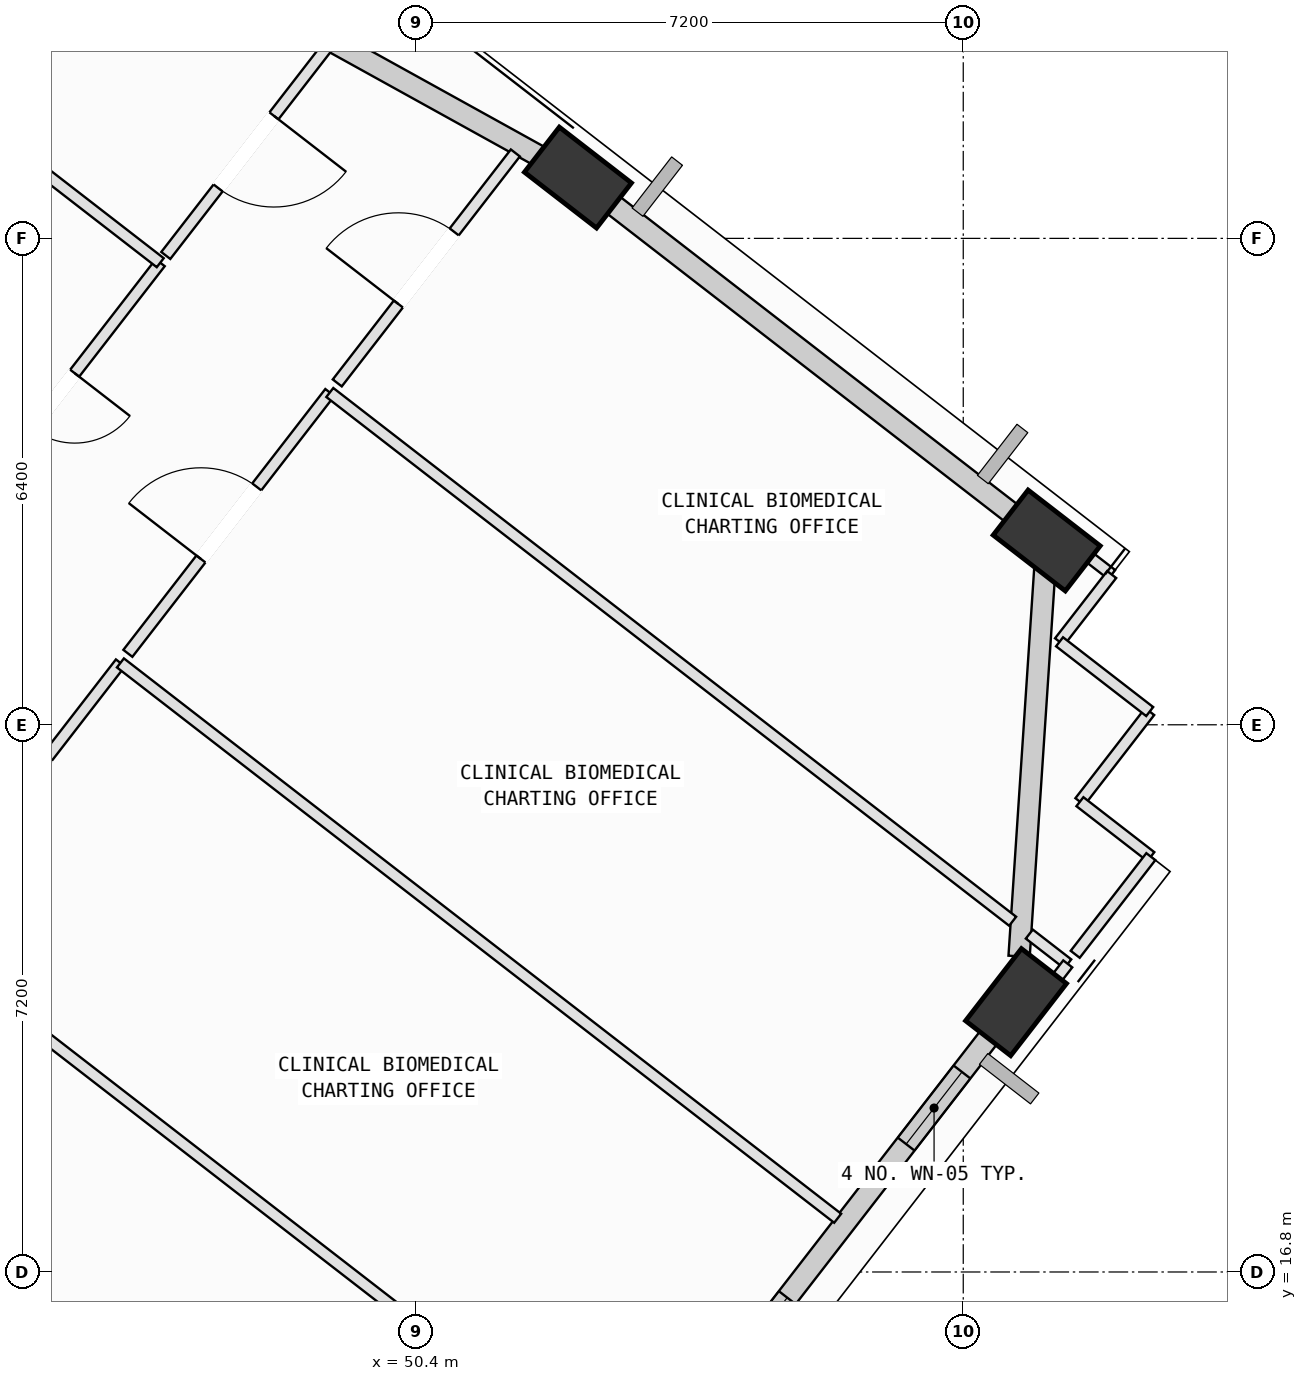
"""IFC4 building model, lengths in metres.
Left out: names, types, materials, properties, quantities, classifications, styles, units other than length and angle.
Written with IfcOpenShell. Run it as: python <this file> out.ifc"""

import sys

from ifc_helpers import new_model, si_unit, direction, frame, frame_2d, origin, origin_2d, place, context, subcontext, project, spatial, rectangle, extrude, element, fill, save


model = new_model("IFC4")
c1 = context("Model", 3, precision=1e-05, world=origin(), true_north=direction((0.0, 1.0)))
c2 = subcontext(c1, "Body", "Model", "MODEL_VIEW")
j1 = project(units=[si_unit("LENGTHUNIT", "METRE"), si_unit("PLANEANGLEUNIT", "RADIAN")], contexts=[c1])
p1 = place(None, origin())
s1 = spatial("IfcSite", under=j1, at=p1, CompositionType="ELEMENT")
p2 = place(p1, origin())
s2 = spatial("IfcBuilding", under=s1, at=p2, CompositionType="ELEMENT")
p3 = place(p2, frame((0.0, 0.0, 247.2)))
s3 = spatial("IfcBuildingStorey", under=s2, at=p3, CompositionType="ELEMENT", Elevation=247.2)
p4 = place(p3, frame((58.295, 20.35, 0.002), z_axis=(0.017499830778, 0.101960819603, 0.994634479188), x_axis=(-0.73642938772, -0.671551052003, 0.081798175143)))
e1 = element("IfcColumn", 1, at=p4, inside=s3, PredefinedType="COLUMN", context=c2, shape_type="SweptSolid", body=[
    extrude(rectangle(XDim=1.2, YDim=0.75, at=origin_2d()), origin(), (0.0, 0.0, 1.0), 4.018),
])
p5 = place(p3, frame((58.698, 26.425, 0.002), z_axis=(-0.007595219156, 0.103416504035, 0.994609138978), x_axis=(0.833166287037, -0.549366665738, 0.063483893394)))
e2 = element("IfcColumn", 2, at=p5, inside=s3, PredefinedType="COLUMN", context=c2, shape_type="SweptSolid", body=[
    extrude(rectangle(XDim=1.2, YDim=0.75, at=origin_2d()), origin(), (0.0, 0.0, 1.0), 4.018),
])
p6 = place(p3, frame((52.531, 31.2, 0.002), z_axis=(-0.027092719635, 0.07799050304, 0.996585904967), x_axis=(0.947118439295, -0.316878141948, 0.050546069114)))
e3 = element("IfcColumn", 3, at=p6, inside=s3, PredefinedType="COLUMN", context=c2, shape_type="SweptSolid", body=[
    extrude(rectangle(XDim=1.2, YDim=0.75, at=origin_2d()), origin(), (0.0, 0.0, 1.0), 4.01),
])
p7 = place(p3, frame((58.171, 20.191, 0.0), z_axis=(0.0, 0.0, 1.0), x_axis=(-0.612216921809, -0.790689851112, 0.0)))
e4 = element("IfcWall", 4, at=p7, inside=s3, PredefinedType="SOLIDWALL", context=c2, shape_type="SweptSolid", body=[
    extrude(rectangle(XDim=6.418, YDim=0.28, at=frame_2d((3.209, 0.0))), origin(), (0.0, 0.0, 1.0), 3.265),
])
p8 = place(p7, frame((0.96, 0.0, 0.75)))
e5 = element("IfcOpeningElement", 5, at=p8, cuts=e4, PredefinedType="OPENING", context=c2, shape_type="SweptSolid", body=[
    extrude(rectangle(XDim=1.2, YDim=1.75, at=frame_2d((0.6, 0.875))), frame((0.0, 0.15, 0.0), z_axis=(0.0, -1.0, 0.0), x_axis=(1.0, 0.0, 0.0)), (0.0, 0.0, 1.0), 0.3),
])
p9 = place(p7, frame((4.715, 0.0, 0.75)))
e6 = element("IfcOpeningElement", 6, at=p9, cuts=e4, PredefinedType="OPENING", context=c2, shape_type="SweptSolid", body=[
    extrude(rectangle(XDim=1.2, YDim=1.75, at=frame_2d((0.6, 0.875))), frame((0.0, 0.15, 0.0), z_axis=(0.0, -1.0, 0.0), x_axis=(1.0, 0.0, 0.0)), (0.0, 0.0, 1.0), 0.3),
])
p10 = place(p3, frame((58.685, 26.235, 0.0), z_axis=(0.0, 0.0, 1.0), x_axis=(-0.066222112401, -0.997804906697, 0.0)))
e7 = element("IfcWall", 7, at=p10, inside=s3, PredefinedType="SOLIDWALL", context=c2, shape_type="SweptSolid", body=[
    extrude(rectangle(XDim=5.294, YDim=0.28, at=frame_2d((2.647, 0.0))), origin(), (0.0, 0.0, 1.0), 3.265),
])
p11 = place(p3, frame((52.727, 31.048, 0.0), z_axis=(0.0, 0.0, 1.0), x_axis=(0.790704771372, -0.612197651522, 0.0)))
e8 = element("IfcWall", 8, at=p11, inside=s3, PredefinedType="SOLIDWALL", context=c2, shape_type="SweptSolid", body=[
    extrude(rectangle(XDim=7.046, YDim=0.28, at=frame_2d((3.523, 0.0))), origin(), (0.0, 0.0, 1.0), 3.265),
])
p12 = place(p3, frame((44.182, 35.82, 0.0), z_axis=(0.0, 0.0, 1.0), x_axis=(0.874960254065, -0.48419474781, 0.0)))
e9 = element("IfcWall", 9, at=p12, inside=s3, PredefinedType="SOLIDWALL", context=c2, shape_type="SweptSolid", body=[
    extrude(rectangle(XDim=9.036, YDim=0.28, at=frame_2d((4.518, 0.0))), origin(), (0.0, 0.0, 1.0), 3.265),
])
p13 = place(p3, frame((41.001, 17.697, 0.0), z_axis=(0.0, 0.0, 1.0), x_axis=(0.790650233598, -0.612268085164, 0.0)))
e10 = element("IfcWall", 10, at=p13, inside=s3, PredefinedType="PARTITIONING", context=c2, shape_type="SweptSolid", body=[
    extrude(rectangle(XDim=11.935, YDim=0.15, at=frame_2d((5.967, 0.0))), origin(), (0.0, 0.0, 1.0), 3.78),
])
p14 = place(p3, frame((43.756, 21.256, 0.0), z_axis=(0.0, 0.0, 1.0), x_axis=(0.790680905168, -0.612228475492, 0.0)))
e11 = element("IfcWall", 11, at=p14, inside=s3, PredefinedType="PARTITIONING", context=c2, shape_type="SweptSolid", body=[
    extrude(rectangle(XDim=11.935, YDim=0.15, at=frame_2d((5.968, 0.0))), origin(), (0.0, 0.0, 1.0), 3.78),
])
p15 = place(p3, frame((43.854, 21.382, 0.0), z_axis=(0.0, 0.0, 1.0), x_axis=(0.612178865646, 0.790719315849, 0.0)))
e12 = element("IfcWall", 12, at=p15, inside=s3, PredefinedType="PARTITIONING", context=c2, shape_type="SweptSolid", body=[
    extrude(rectangle(XDim=4.34, YDim=0.15, at=frame_2d((2.17, 0.0))), origin(), (0.0, 0.0, 1.0), 3.78),
])
p16 = place(p15, frame((1.57, 0.0, 0.0)))
e13 = element("IfcOpeningElement", 13, at=p16, cuts=e12, PredefinedType="OPENING", context=c2, shape_type="SweptSolid", body=[
    extrude(rectangle(XDim=1.2, YDim=2.15, at=frame_2d((0.6, 1.075))), frame((0.0, 0.085, 0.0), z_axis=(0.0, -1.0, 0.0), x_axis=(1.0, 0.0, 0.0)), (0.0, 0.0, 1.0), 0.17),
])
p17 = place(p3, frame((46.511, 24.814, 0.0), z_axis=(0.0, 0.0, 1.0), x_axis=(0.790690807158, -0.612215687055, 0.0)))
e14 = element("IfcWall", 14, at=p17, inside=s3, PredefinedType="PARTITIONING", context=c2, shape_type="SweptSolid", body=[
    extrude(rectangle(XDim=11.935, YDim=0.15, at=frame_2d((5.968, 0.0))), origin(), (0.0, 0.0, 1.0), 3.78),
])
p18 = place(p3, frame((46.609, 24.94, 0.0), z_axis=(0.0, 0.0, 1.0), x_axis=(0.612186806235, 0.790713168141, 0.0)))
e15 = element("IfcWall", 15, at=p18, inside=s3, PredefinedType="PARTITIONING", context=c2, shape_type="SweptSolid", body=[
    extrude(rectangle(XDim=4.341, YDim=0.15, at=frame_2d((2.17, 0.0))), origin(), (0.0, 0.0, 1.0), 3.78),
])
p19 = place(p18, frame((1.57, 0.0, 0.0)))
e16 = element("IfcOpeningElement", 16, at=p19, cuts=e15, PredefinedType="OPENING", context=c2, shape_type="SweptSolid", body=[
    extrude(rectangle(XDim=1.2, YDim=2.15, at=frame_2d((0.6, 1.075))), frame((0.0, 0.085, 0.0), z_axis=(0.0, -1.0, 0.0), x_axis=(1.0, 0.0, 0.0)), (0.0, 0.0, 1.0), 0.17),
])
p20 = place(p3, frame((49.266, 28.372, 0.0), z_axis=(0.0, 0.0, 1.0), x_axis=(0.790648548944, -0.612270260631, 0.0)))
e17 = element("IfcWall", 17, at=p20, inside=s3, PredefinedType="PARTITIONING", context=c2, shape_type="SweptSolid", body=[
    extrude(rectangle(XDim=11.363, YDim=0.15, at=frame_2d((5.681, 0.0))), origin(), (0.0, 0.0, 1.0), 3.78),
])
p21 = place(p3, frame((58.469, 21.246, 0.0), z_axis=(0.0, 0.0, 1.0), x_axis=(0.790521208436, -0.612434665098, 0.0)))
e18 = element("IfcWall", 18, at=p21, inside=s3, PredefinedType="PARTITIONING", context=c2, shape_type="SweptSolid", body=[
    extrude(rectangle(XDim=0.64, YDim=0.15, at=frame_2d((0.32, 0.0))), origin(), (0.0, 0.0, 1.0), 3.78),
])
p22 = place(p3, frame((58.975, 20.854, 0.0), z_axis=(0.0, 0.0, 1.0), x_axis=(-0.611960031157, -0.790888690188, 0.0)))
e19 = element("IfcWall", 19, at=p22, inside=s3, PredefinedType="PARTITIONING", context=c2, shape_type="SweptSolid", body=[
    extrude(rectangle(XDim=1.017, YDim=0.15, at=frame_2d((0.508, 0.0))), origin(), (0.0, 0.0, 1.0), 3.265),
])
p23 = place(p3, frame((60.053, 24.174, 0.0), z_axis=(0.0, 0.0, 1.0), x_axis=(-0.612068124606, -0.790805039717, 0.0)))
e20 = element("IfcWall", 20, at=p23, inside=s3, PredefinedType="PARTITIONING", context=c2, shape_type="SweptSolid", body=[
    extrude(rectangle(XDim=1.5, YDim=0.15, at=frame_2d((0.75, 0.0))), origin(), (0.0, 0.0, 1.0), 3.78),
])
p24 = place(p3, frame((59.135, 22.988, 0.0), z_axis=(0.0, 0.0, 1.0), x_axis=(0.790420058824, -0.61256520519, 0.0)))
e21 = element("IfcWall", 21, at=p24, inside=s3, PredefinedType="PARTITIONING", context=c2, shape_type="SweptSolid", body=[
    extrude(rectangle(XDim=1.18, YDim=0.15, at=frame_2d((0.59, 0.0))), origin(), (0.0, 0.0, 1.0), 3.78),
])
p25 = place(p3, frame((60.068, 22.265, 0.0), z_axis=(0.0, 0.0, 1.0), x_axis=(-0.612306498118, -0.790620485671, 0.0)))
e22 = element("IfcWall", 22, at=p25, inside=s3, PredefinedType="PARTITIONING", context=c2, shape_type="SweptSolid", body=[
    extrude(rectangle(XDim=1.625, YDim=0.15, at=frame_2d((0.812, 0.0))), origin(), (0.0, 0.0, 1.0), 3.78),
])
p26 = place(p3, frame((49.364, 28.498, 0.0), z_axis=(0.0, 0.0, 1.0), x_axis=(0.612238811962, 0.790672901475, 0.0)))
e23 = element("IfcWall", 23, at=p26, inside=s3, PredefinedType="PARTITIONING", context=c2, shape_type="SweptSolid", body=[
    extrude(rectangle(XDim=3.827, YDim=0.15, at=frame_2d((1.914, 0.0))), origin(), (0.0, 0.0, 1.0), 3.78),
])
p27 = place(p26, frame((1.313, 0.0, 0.0)))
e24 = element("IfcOpeningElement", 24, at=p27, cuts=e23, PredefinedType="OPENING", context=c2, shape_type="SweptSolid", body=[
    extrude(rectangle(XDim=1.2, YDim=2.15, at=frame_2d((0.6, 1.075))), frame((0.0, 0.085, 0.0), z_axis=(0.0, -1.0, 0.0), x_axis=(1.0, 0.0, 0.0)), (0.0, 0.0, 1.0), 0.17),
])
p28 = place(p3, frame((52.21, 31.664, 0.0), z_axis=(0.0, 0.0, 1.0), x_axis=(0.790655761148, -0.612260947116, 0.0)))
e25 = element("IfcWall", 25, at=p28, inside=s3, PredefinedType="PARTITIONING", context=c2, shape_type="SweptSolid", body=[
    extrude(rectangle(XDim=0.786, YDim=0.15, at=frame_2d((0.393, 0.0))), origin(), (0.0, 0.0, 1.0), 3.265),
])
p29 = place(p3, frame((58.402, 26.868, 0.0), z_axis=(0.0, 0.0, 1.0), x_axis=(0.790768234829, -0.612115674351, 0.0)))
e26 = element("IfcWall", 26, at=p29, inside=s3, PredefinedType="PARTITIONING", context=c2, shape_type="SweptSolid", body=[
    extrude(rectangle(XDim=1.455, YDim=0.15, at=frame_2d((0.728, 0.0))), origin(), (0.0, 0.0, 1.0), 3.265),
])
p30 = place(p3, frame((59.553, 25.977, 0.0), z_axis=(0.0, 0.0, 1.0), x_axis=(-0.612656795553, -0.790349068996, 0.0)))
e27 = element("IfcWall", 27, at=p30, inside=s3, PredefinedType="PARTITIONING", context=c2, shape_type="SweptSolid", body=[
    extrude(rectangle(XDim=1.12, YDim=0.15, at=frame_2d((0.56, 0.0))), origin(), (0.0, 0.0, 1.0), 3.78),
])
p31 = place(p3, frame((58.867, 25.092, 0.0), z_axis=(0.0, 0.0, 1.0), x_axis=(0.790805039717, -0.612068124606, 0.0)))
e28 = element("IfcWall", 28, at=p31, inside=s3, PredefinedType="PARTITIONING", context=c2, shape_type="SweptSolid", body=[
    extrude(rectangle(XDim=1.5, YDim=0.15, at=frame_2d((0.75, 0.0))), origin(), (0.0, 0.0, 1.0), 3.78),
])
p32 = place(p3, frame((47.035, 30.08, 0.0), z_axis=(0.0, 0.0, 1.0), x_axis=(-0.612273865453, -0.790645757393, 0.0)))
e29 = element("IfcWall", 29, at=p32, inside=s3, PredefinedType="PARTITIONING", context=c2, shape_type="SweptSolid", body=[
    extrude(rectangle(XDim=4.597, YDim=0.15, at=frame_2d((2.299, 0.0))), origin(), (0.0, 0.0, 1.0), 3.78),
])
p33 = place(p32, frame((1.839, 0.0, 0.0)))
e30 = element("IfcOpeningElement", 30, at=p33, cuts=e29, PredefinedType="OPENING", context=c2, shape_type="SweptSolid", body=[
    extrude(rectangle(XDim=0.92, YDim=2.1, at=frame_2d((0.46, 1.05))), frame((0.0, 0.085, 0.0), z_axis=(0.0, -1.0, 0.0), x_axis=(1.0, 0.0, 0.0)), (0.0, 0.0, 1.0), 0.17),
])
p34 = place(p3, frame((42.35, 33.708, 0.0), z_axis=(0.0, 0.0, 1.0), x_axis=(0.790643922071, -0.612276235446, 0.0)))
e31 = element("IfcWall", 31, at=p34, inside=s3, PredefinedType="PARTITIONING", context=c2, shape_type="SweptSolid", body=[
    extrude(rectangle(XDim=5.925, YDim=0.15, at=frame_2d((2.963, 0.0))), origin(), (0.0, 0.0, 1.0), 3.78),
])
p35 = place(p3, frame((49.219, 32.901, 0.0), z_axis=(0.0, 0.0, 1.0), x_axis=(-0.612311720881, -0.790616440805, 0.0)))
e32 = element("IfcWall", 32, at=p35, inside=s3, PredefinedType="PARTITIONING", context=c2, shape_type="SweptSolid", body=[
    extrude(rectangle(XDim=3.448, YDim=0.15, at=frame_2d((1.724, 0.0))), origin(), (0.0, 0.0, 1.0), 3.78),
])
p36 = place(p35, frame((1.124, 0.0, 0.0)))
e33 = element("IfcOpeningElement", 33, at=p36, cuts=e32, PredefinedType="OPENING", context=c2, shape_type="SweptSolid", body=[
    extrude(rectangle(XDim=1.2, YDim=2.15, at=frame_2d((0.6, 1.075))), frame((0.0, 0.085, 0.0), z_axis=(0.0, -1.0, 0.0), x_axis=(1.0, 0.0, 0.0)), (0.0, 0.0, 1.0), 0.17),
])
p37 = place(p8, origin())
e34 = element("IfcWindow", 34, at=p37, inside=s3, PartitioningType="SINGLE_PANEL", PredefinedType="WINDOW", context=c2, shape_type="SweptSolid", body=[
    extrude(rectangle(XDim=1.2, YDim=1.75, at=frame_2d((0.6, 0.875))), frame((0.0, 0.03, 0.0), z_axis=(0.0, -1.0, 0.0), x_axis=(1.0, 0.0, 0.0)), (0.0, 0.0, 1.0), 0.06),
])
fill(e5, e34)
p38 = place(p9, origin())
e35 = element("IfcWindow", 35, at=p38, inside=s3, PartitioningType="SINGLE_PANEL", PredefinedType="WINDOW", context=c2, shape_type="SweptSolid", body=[
    extrude(rectangle(XDim=1.2, YDim=1.75, at=frame_2d((0.6, 0.875))), frame((0.0, 0.03, 0.0), z_axis=(0.0, -1.0, 0.0), x_axis=(1.0, 0.0, 0.0)), (0.0, 0.0, 1.0), 0.06),
])
fill(e6, e35)
p39 = place(p19, origin())
e36 = element("IfcDoor", 36, at=p39, inside=s3, OperationType="SINGLE_SWING_LEFT", PredefinedType="DOOR", context=c2, shape_type="SweptSolid", body=[
    extrude(rectangle(XDim=1.2, YDim=2.15, at=frame_2d((0.6, 1.075))), frame((0.0, 0.025, 0.0), z_axis=(0.0, -1.0, 0.0), x_axis=(1.0, 0.0, 0.0)), (0.0, 0.0, 1.0), 0.05),
])
fill(e16, e36)
p40 = place(p27, origin())
e37 = element("IfcDoor", 37, at=p40, inside=s3, OperationType="SINGLE_SWING_LEFT", PredefinedType="DOOR", context=c2, shape_type="SweptSolid", body=[
    extrude(rectangle(XDim=1.2, YDim=2.15, at=frame_2d((0.6, 1.075))), frame((0.0, 0.025, 0.0), z_axis=(0.0, -1.0, 0.0), x_axis=(1.0, 0.0, 0.0)), (0.0, 0.0, 1.0), 0.05),
])
fill(e24, e37)
p41 = place(p33, origin())
e38 = element("IfcDoor", 38, at=p41, inside=s3, OperationType="SINGLE_SWING_LEFT", PredefinedType="DOOR", context=c2, shape_type="SweptSolid", body=[
    extrude(rectangle(XDim=0.92, YDim=2.1, at=frame_2d((0.46, 1.05))), frame((0.0, 0.025, 0.0), z_axis=(0.0, -1.0, 0.0), x_axis=(1.0, 0.0, 0.0)), (0.0, 0.0, 1.0), 0.05),
])
fill(e30, e38)
p42 = place(p36, origin())
e39 = element("IfcDoor", 39, at=p42, inside=s3, OperationType="SINGLE_SWING_LEFT", PredefinedType="DOOR", context=c2, shape_type="SweptSolid", body=[
    extrude(rectangle(XDim=1.2, YDim=2.15, at=frame_2d((0.6, 1.075))), frame((0.0, 0.025, 0.0), z_axis=(0.0, -1.0, 0.0), x_axis=(1.0, 0.0, 0.0)), (0.0, 0.0, 1.0), 0.05),
])
fill(e33, e39)
save(model, sys.argv[1])
